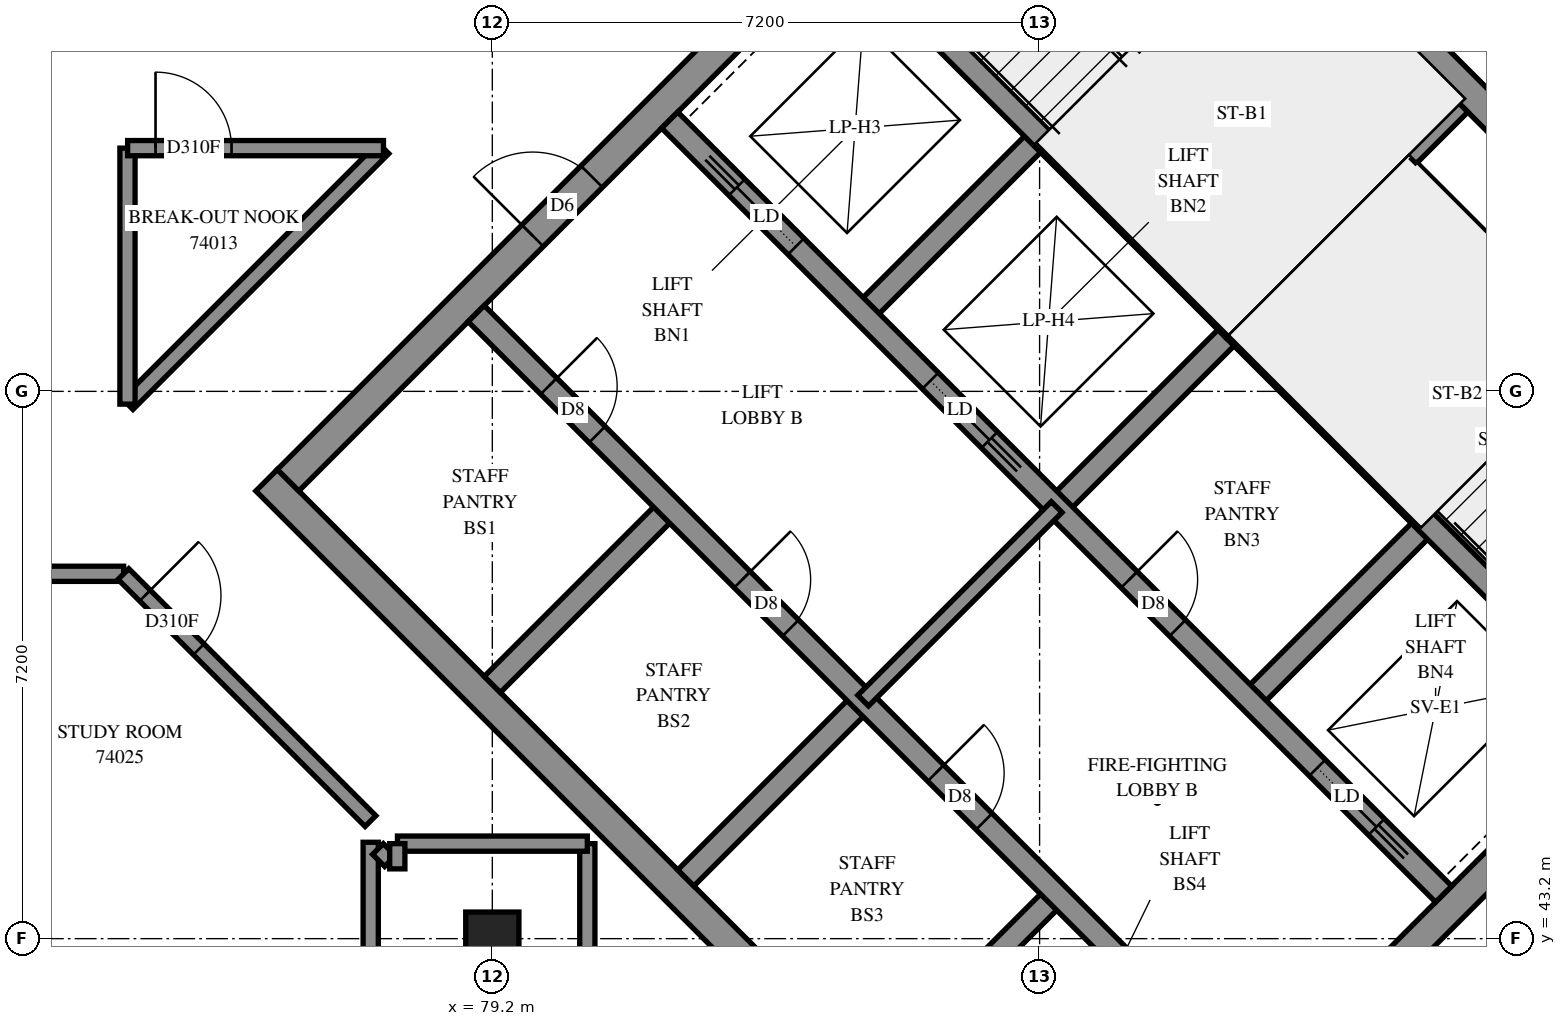
"""IFC4 building model, lengths in metres.
Left out: names, types, materials, properties, quantities, classifications, styles, units other than length and angle.
Written with IfcOpenShell. Run it as: python <this file> out.ifc"""

import sys

from ifc_helpers import new_model, si_unit, direction, frame, frame_2d, origin, origin_2d, place, context, subcontext, project, spatial, rectangle, extrude, element, fill, save


model = new_model("IFC4")
c1 = context("Model", 3, precision=1e-05, world=origin(), true_north=direction((0.0, 1.0)))
c2 = subcontext(c1, "Body", "Model", "MODEL_VIEW")
j1 = project(units=[si_unit("LENGTHUNIT", "METRE"), si_unit("PLANEANGLEUNIT", "RADIAN")], contexts=[c1])
p1 = place(None, origin())
s1 = spatial("IfcSite", under=j1, at=p1, CompositionType="ELEMENT")
p2 = place(p1, origin())
s2 = spatial("IfcBuilding", under=s1, at=p2, CompositionType="ELEMENT")
p3 = place(p2, frame((0.0, 0.0, 271.0)))
s3 = spatial("IfcBuildingStorey", under=s2, at=p3, CompositionType="ELEMENT", Elevation=271.0)
p4 = place(p3, frame((79.2, 43.2, 0.0), z_axis=(0.0, 0.0, 1.0), x_axis=(1.0, 0.0, 0.0)))
e1 = element("IfcColumn", 1, at=p4, inside=s3, PredefinedType="COLUMN", context=c2, shape_type="SweptSolid", body=[
    extrude(rectangle(XDim=0.7, YDim=0.7, at=origin_2d()), origin(), (0.0, 0.0, 1.0), 3.1),
])
p5 = place(p3, frame((76.23, 49.231, -0.3), z_axis=(0.0, 0.0, 1.0), x_axis=(0.7071034917, -0.7071100706, 0.0)))
e2 = element("IfcWall", 2, at=p5, inside=s3, PredefinedType="SHEAR", context=c2, shape_type="SweptSolid", body=[
    extrude(rectangle(XDim=15.2, YDim=0.4, at=frame_2d((7.6, 0.0))), origin(), (0.0, 0.0, 1.0), 2.7),
])
p6 = place(p3, frame((86.695, 59.696, -0.3), z_axis=(0.0, 0.0, 1.0), x_axis=(0.7071100706, -0.7071034917, 0.0)))
e3 = element("IfcWall", 3, at=p6, inside=s3, PredefinedType="SHEAR", context=c2, shape_type="SweptSolid", body=[
    extrude(rectangle(XDim=15.2, YDim=0.4, at=frame_2d((7.6, 0.0))), origin(), (0.0, 0.0, 1.0), 2.7),
])
p7 = place(p6, frame((10.4, 0.0, 0.3)))
e4 = element("IfcOpeningElement", 4, at=p7, cuts=e3, PredefinedType="OPENING", context=c2, shape_type="SweptSolid", body=[
    extrude(rectangle(XDim=0.8, YDim=2.1, at=frame_2d((0.4, 1.05))), frame((0.0, 0.21, 0.0), z_axis=(0.0, -1.0, 0.0), x_axis=(1.0, 0.0, 0.0)), (0.0, 0.0, 1.0), 0.42),
])
p8 = place(p3, frame((76.513, 49.231, -0.3), z_axis=(0.0, 0.0, 1.0), x_axis=(0.7071067812, 0.7071067812, 0.0)))
e5 = element("IfcWall", 5, at=p8, inside=s3, PredefinedType="SHEAR", context=c2, shape_type="SweptSolid", body=[
    extrude(rectangle(XDim=14.4, YDim=0.4, at=frame_2d((7.2, 0.0))), origin(), (0.0, 0.0, 1.0), 2.7),
])
p9 = place(p8, frame((4.55, 0.0, 0.3)))
e6 = element("IfcOpeningElement", 6, at=p9, cuts=e5, PredefinedType="OPENING", context=c2, shape_type="SweptSolid", body=[
    extrude(rectangle(XDim=1.1, YDim=2.1, at=frame_2d((0.55, 1.05))), frame((0.0, 0.21, 0.0), z_axis=(0.0, -1.0, 0.0), x_axis=(1.0, 0.0, 0.0)), (0.0, 0.0, 1.0), 0.42),
])
p10 = place(p8, frame((11.35, 0.0, 0.3)))
e7 = element("IfcOpeningElement", 7, at=p10, cuts=e5, PredefinedType="OPENING", context=c2, shape_type="SweptSolid", body=[
    extrude(rectangle(XDim=1.1, YDim=2.1, at=frame_2d((0.55, 1.05))), frame((0.0, 0.21, 0.0), z_axis=(0.0, -1.0, 0.0), x_axis=(1.0, 0.0, 0.0)), (0.0, 0.0, 1.0), 0.42),
])
p11 = place(p3, frame((86.978, 38.766, -0.3), z_axis=(0.0, 0.0, 1.0), x_axis=(0.7071067812, 0.7071067812, 0.0)))
e8 = element("IfcWall", 8, at=p11, inside=s3, PredefinedType="SHEAR", context=c2, shape_type="SweptSolid", body=[
    extrude(rectangle(XDim=14.4, YDim=0.4, at=frame_2d((7.2, 0.0))), origin(), (0.0, 0.0, 1.0), 2.7),
])
p12 = place(p11, frame((4.55, 0.0, 0.3)))
e9 = element("IfcOpeningElement", 9, at=p12, cuts=e8, PredefinedType="OPENING", context=c2, shape_type="SweptSolid", body=[
    extrude(rectangle(XDim=1.1, YDim=2.1, at=frame_2d((0.55, 1.05))), frame((0.0, 0.21, 0.0), z_axis=(0.0, -1.0, 0.0), x_axis=(1.0, 0.0, 0.0)), (0.0, 0.0, 1.0), 0.42),
])
p13 = place(p11, frame((11.35, 0.0, 0.3)))
e10 = element("IfcOpeningElement", 10, at=p13, cuts=e8, PredefinedType="OPENING", context=c2, shape_type="SweptSolid", body=[
    extrude(rectangle(XDim=1.1, YDim=2.1, at=frame_2d((0.55, 1.05))), frame((0.0, 0.21, 0.0), z_axis=(0.0, -1.0, 0.0), x_axis=(1.0, 0.0, 0.0)), (0.0, 0.0, 1.0), 0.42),
])
for number, where, z_axis, x_axis in (
    (11, (79.2, 46.544, 0.0), (0.0, 0.0, 1.0), (0.707, 0.707, 0.0)),
    (12, (84.079, 51.423, 0.0), (0.0, 0.0, 1.0), (0.707, 0.707, 0.0)),
):
    element("IfcWall", number, at=place(p3, frame(where, z_axis=z_axis, x_axis=x_axis)), inside=s3, PredefinedType="SOLIDWALL", context=c2, shape_type="SweptSolid", body=[
        extrude(rectangle(XDim=3.3, YDim=0.3, at=frame_2d((1.65, 0.0))), origin(), (0.0, 0.0, 1.0), 3.1),
    ])
p14 = place(p3, frame((81.746, 43.999, 0.0), z_axis=(0.0, 0.0, 1.0), x_axis=(0.7071067812, 0.7071067812, 0.0)))
e13 = element("IfcWall", 13, at=p14, inside=s3, PredefinedType="SOLIDWALL", context=c2, shape_type="SweptSolid", body=[
    extrude(rectangle(XDim=3.3, YDim=0.3, at=frame_2d((1.65, 0.0))), origin(), (0.0, 0.0, 1.0), 3.1),
])
p15 = place(p3, frame((86.625, 48.878, 0.0), z_axis=(0.0, 0.0, 1.0), x_axis=(0.7071067812, 0.7071067812, 0.0)))
e14 = element("IfcWall", 14, at=p15, inside=s3, PredefinedType="SOLIDWALL", context=c2, shape_type="SweptSolid", body=[
    extrude(rectangle(XDim=3.3, YDim=0.3, at=frame_2d((1.65, 0.0))), origin(), (0.0, 0.0, 1.0), 3.1),
])
p16 = place(p3, frame((84.291, 41.453, 0.0), z_axis=(0.0, 0.0, 1.0), x_axis=(0.7071067812, 0.7071067812, 0.0)))
e15 = element("IfcWall", 15, at=p16, inside=s3, PredefinedType="SOLIDWALL", context=c2, shape_type="SweptSolid", body=[
    extrude(rectangle(XDim=3.3, YDim=0.3, at=frame_2d((1.65, 0.0))), origin(), (0.0, 0.0, 1.0), 3.1),
])
p17 = place(p3, frame((89.17, 46.332, 0.0), z_axis=(0.0, 0.0, 1.0), x_axis=(0.7071067812, 0.7071067812, 0.0)))
e16 = element("IfcWall", 16, at=p17, inside=s3, PredefinedType="SOLIDWALL", context=c2, shape_type="SweptSolid", body=[
    extrude(rectangle(XDim=3.3, YDim=0.3, at=frame_2d((1.65, 0.0))), origin(), (0.0, 0.0, 1.0), 3.1),
])
p18 = place(p3, frame((78.988, 51.423, 0.0), z_axis=(0.0, 0.0, 1.0), x_axis=(0.7071067812, -0.7071067812, 0.0)))
e17 = element("IfcWall", 17, at=p18, inside=s3, PredefinedType="SOLIDWALL", context=c2, shape_type="SweptSolid", body=[
    extrude(rectangle(XDim=14.4, YDim=0.3, at=frame_2d((7.2, 0.0))), origin(), (0.0, 0.0, 1.0), 3.1),
])
p19 = place(p18, frame((1.35, 0.0, 0.0)))
e18 = element("IfcOpeningElement", 18, at=p19, cuts=e17, PredefinedType="OPENING", context=c2, shape_type="SweptSolid", body=[
    extrude(rectangle(XDim=0.9, YDim=2.1, at=frame_2d((0.45, 1.05))), frame((0.0, 0.16, 0.0), z_axis=(0.0, -1.0, 0.0), x_axis=(1.0, 0.0, 0.0)), (0.0, 0.0, 1.0), 0.32),
])
p20 = place(p18, frame((4.95, 0.0, 0.0)))
e19 = element("IfcOpeningElement", 19, at=p20, cuts=e17, PredefinedType="OPENING", context=c2, shape_type="SweptSolid", body=[
    extrude(rectangle(XDim=0.9, YDim=2.1, at=frame_2d((0.45, 1.05))), frame((0.0, 0.16, 0.0), z_axis=(0.0, -1.0, 0.0), x_axis=(1.0, 0.0, 0.0)), (0.0, 0.0, 1.0), 0.32),
])
p21 = place(p18, frame((8.55, 0.0, 0.0)))
e20 = element("IfcOpeningElement", 20, at=p21, cuts=e17, PredefinedType="OPENING", context=c2, shape_type="SweptSolid", body=[
    extrude(rectangle(XDim=0.9, YDim=2.1, at=frame_2d((0.45, 1.05))), frame((0.0, 0.16, 0.0), z_axis=(0.0, -1.0, 0.0), x_axis=(1.0, 0.0, 0.0)), (0.0, 0.0, 1.0), 0.32),
])
p22 = place(p18, frame((12.05, 0.0, 0.0)))
e21 = element("IfcOpeningElement", 21, at=p22, cuts=e17, PredefinedType="OPENING", context=c2, shape_type="SweptSolid", body=[
    extrude(rectangle(XDim=1.1, YDim=2.1, at=frame_2d((0.55, 1.05))), frame((0.0, 0.16, 0.0), z_axis=(0.0, -1.0, 0.0), x_axis=(1.0, 0.0, 0.0)), (0.0, 0.0, 1.0), 0.32),
])
p23 = place(p3, frame((81.534, 53.969, 0.0), z_axis=(0.0, 0.0, 1.0), x_axis=(0.707103309, -0.7071102534, 0.0)))
e22 = element("IfcWall", 22, at=p23, inside=s3, PredefinedType="SOLIDWALL", context=c2, shape_type="SweptSolid", body=[
    extrude(rectangle(XDim=14.4, YDim=0.3, at=frame_2d((7.2, 0.0))), origin(), (0.0, 0.0, 1.0), 3.1),
])
p24 = place(p23, frame((8.55, 0.0, 0.0)))
e23 = element("IfcOpeningElement", 23, at=p24, cuts=e22, PredefinedType="OPENING", context=c2, shape_type="SweptSolid", body=[
    extrude(rectangle(XDim=0.9, YDim=2.1, at=frame_2d((0.45, 1.05))), frame((0.0, 0.16, 0.0), z_axis=(0.0, -1.0, 0.0), x_axis=(1.0, 0.0, 0.0)), (0.0, 0.0, 1.0), 0.32),
])
p25 = place(p23, frame((1.25, 0.0, 0.0)))
e24 = element("IfcOpeningElement", 24, at=p25, cuts=e22, PredefinedType="OPENING", context=c2, shape_type="SweptSolid", body=[
    extrude(rectangle(XDim=1.1, YDim=2.1, at=frame_2d((0.55, 1.05))), frame((0.0, 0.16, 0.0), z_axis=(0.0, -1.0, 0.0), x_axis=(1.0, 0.0, 0.0)), (0.0, 0.0, 1.0), 0.32),
])
p26 = place(p23, frame((4.85, 0.0, 0.0)))
e25 = element("IfcOpeningElement", 25, at=p26, cuts=e22, PredefinedType="OPENING", context=c2, shape_type="SweptSolid", body=[
    extrude(rectangle(XDim=1.1, YDim=2.1, at=frame_2d((0.55, 1.05))), frame((0.0, 0.16, 0.0), z_axis=(0.0, -1.0, 0.0), x_axis=(1.0, 0.0, 0.0)), (0.0, 0.0, 1.0), 0.32),
])
p27 = place(p23, frame((12.05, 0.0, 0.0)))
e26 = element("IfcOpeningElement", 26, at=p27, cuts=e22, PredefinedType="OPENING", context=c2, shape_type="SweptSolid", body=[
    extrude(rectangle(XDim=1.1, YDim=2.1, at=frame_2d((0.55, 1.05))), frame((0.0, 0.16, 0.0), z_axis=(0.0, -1.0, 0.0), x_axis=(1.0, 0.0, 0.0)), (0.0, 0.0, 1.0), 0.32),
])
for number, where, z_axis, x_axis in (
    (27, (83.867, 56.302, 0.0), (0.0, 0.0, 1.0), (0.707, -0.707, 0.0)),
    (28, (88.958, 51.211, 0.0), (0.0, 0.0, 1.0), (0.707, -0.707, 0.0)),
):
    element("IfcWall", number, at=place(p3, frame(where, z_axis=z_axis, x_axis=x_axis)), inside=s3, PredefinedType="SOLIDWALL", context=c2, shape_type="SweptSolid", body=[
        extrude(rectangle(XDim=7.2, YDim=0.3, at=frame_2d((3.6, 0.0))), origin(), (0.0, 0.0, 1.0), 3.1),
    ])
p28 = place(p3, frame((88.958, 51.211, 0.0), z_axis=(0.0, 0.0, 1.0), x_axis=(0.7071067812, 0.7071067812, 0.0)))
e29 = element("IfcWall", 29, at=p28, inside=s3, PredefinedType="SOLIDWALL", context=c2, shape_type="SweptSolid", body=[
    extrude(rectangle(XDim=4.2, YDim=0.3, at=frame_2d((2.1, 0.0))), origin(), (0.0, 0.0, 1.0), 3.1),
])
p29 = place(p3, frame((91.313, 53.354, 0.0), z_axis=(0.0, 0.0, 1.0), x_axis=(0.7071067812, -0.7071067812, 0.0)))
e30 = element("IfcWall", 30, at=p29, inside=s3, PredefinedType="PARTITIONING", context=c2, shape_type="SweptSolid", body=[
    extrude(rectangle(XDim=5.95, YDim=0.15, at=frame_2d((2.975, 0.0))), origin(), (0.0, 0.0, 1.0), 3.1),
])
p30 = place(p3, frame((84.079, 46.332, 0.0), z_axis=(0.0, 0.0, 1.0), x_axis=(0.7071067812, 0.7071067812, 0.0)))
e31 = element("IfcWall", 31, at=p30, inside=s3, PredefinedType="PARTITIONING", context=c2, shape_type="SweptSolid", body=[
    extrude(rectangle(XDim=3.6, YDim=0.2, at=frame_2d((1.8, 0.0))), origin(), (0.0, 0.0, 1.0), 3.1),
])
p31 = place(p3, frame((55.2, 48.0, 0.0), z_axis=(0.0, 0.0, 1.0), x_axis=(1.0, 0.0, 0.0)))
e32 = element("IfcWall", 32, at=p31, inside=s3, PredefinedType="PARTITIONING", context=c2, shape_type="SweptSolid", body=[
    extrude(rectangle(XDim=19.15, YDim=0.2, at=frame_2d((9.575, 0.0))), origin(), (0.0, 0.0, 1.0), 3.1),
])
p32 = place(p31, frame((4.433, 0.0, 0.0)))
e33 = element("IfcOpeningElement", 33, at=p32, cuts=e32, PredefinedType="OPENING", context=c2, shape_type="SweptSolid", body=[
    extrude(rectangle(XDim=1.0, YDim=2.1, at=frame_2d((0.5, 1.05))), frame((0.0, 0.11, 0.0), z_axis=(0.0, -1.0, 0.0), x_axis=(1.0, 0.0, 0.0)), (0.0, 0.0, 1.0), 0.22),
])
p33 = place(p31, frame((6.508, 0.0, 0.0)))
e34 = element("IfcOpeningElement", 34, at=p33, cuts=e32, PredefinedType="OPENING", context=c2, shape_type="SweptSolid", body=[
    extrude(rectangle(XDim=1.0, YDim=2.1, at=frame_2d((0.5, 1.05))), frame((0.0, 0.11, 0.0), z_axis=(0.0, -1.0, 0.0), x_axis=(1.0, 0.0, 0.0)), (0.0, 0.0, 1.0), 0.22),
])
p34 = place(p31, frame((13.499, 0.0, 0.0)))
e35 = element("IfcOpeningElement", 35, at=p34, cuts=e32, PredefinedType="OPENING", context=c2, shape_type="SweptSolid", body=[
    extrude(rectangle(XDim=0.9, YDim=2.1, at=frame_2d((0.45, 1.05))), frame((0.0, 0.11, 0.0), z_axis=(0.0, -1.0, 0.0), x_axis=(1.0, 0.0, 0.0)), (0.0, 0.0, 1.0), 0.22),
])
p35 = place(p3, frame((74.401, 50.233, 0.0), z_axis=(0.0, 0.0, 1.0), x_axis=(0.7071067812, 0.7071067812, 0.0)))
e36 = element("IfcWall", 36, at=p35, inside=s3, PredefinedType="PARTITIONING", context=c2, shape_type="SweptSolid", body=[
    extrude(rectangle(XDim=4.76, YDim=0.2, at=frame_2d((2.38, 0.0))), origin(), (0.0, 0.0, 1.0), 3.1),
])
p36 = place(p3, frame((74.347, 47.997, 0.0), z_axis=(0.0, 0.0, 1.0), x_axis=(0.7071067812, -0.7071067812, 0.0)))
e37 = element("IfcWall", 37, at=p36, inside=s3, PredefinedType="PARTITIONING", context=c2, shape_type="SweptSolid", body=[
    extrude(rectangle(XDim=4.596, YDim=0.2, at=frame_2d((2.298, 0.0))), origin(), (0.0, 0.0, 1.0), 3.1),
])
p37 = place(p36, frame((0.401, 0.0, 0.0)))
e38 = element("IfcOpeningElement", 38, at=p37, cuts=e37, PredefinedType="OPENING", context=c2, shape_type="SweptSolid", body=[
    extrude(rectangle(XDim=1.0, YDim=2.1, at=frame_2d((0.5, 1.05))), frame((0.0, 0.11, 0.0), z_axis=(0.0, -1.0, 0.0), x_axis=(1.0, 0.0, 0.0)), (0.0, 0.0, 1.0), 0.22),
])
p38 = place(p3, frame((74.4, 50.232, 0.0), z_axis=(0.0, 0.0, 1.0), x_axis=(0.0, 1.0, 0.0)))
e39 = element("IfcWall", 39, at=p38, inside=s3, PredefinedType="PARTITIONING", context=c2, shape_type="SweptSolid", body=[
    extrude(rectangle(XDim=3.368, YDim=0.2, at=frame_2d((1.684, 0.0))), origin(), (0.0, 0.0, 1.0), 3.1),
])
p39 = place(p3, frame((74.402, 53.6, 0.0), z_axis=(0.0, 0.0, 1.0), x_axis=(1.0, 0.0, 0.0)))
e40 = element("IfcWall", 40, at=p39, inside=s3, PredefinedType="PARTITIONING", context=c2, shape_type="SweptSolid", body=[
    extrude(rectangle(XDim=3.366, YDim=0.2, at=frame_2d((1.683, 0.0))), origin(), (0.0, 0.0, 1.0), 3.1),
])
p40 = place(p39, frame((0.367, 0.0, 0.0)))
e41 = element("IfcOpeningElement", 41, at=p40, cuts=e40, PredefinedType="OPENING", context=c2, shape_type="SweptSolid", body=[
    extrude(rectangle(XDim=1.0, YDim=2.1, at=frame_2d((0.5, 1.05))), frame((0.0, 0.11, 0.0), z_axis=(0.0, -1.0, 0.0), x_axis=(1.0, 0.0, 0.0)), (0.0, 0.0, 1.0), 0.22),
])
p41 = place(p3, frame((77.6, 41.487, 0.0), z_axis=(0.0, 0.0, 1.0), x_axis=(0.0, 1.0, 0.0)))
e42 = element("IfcWall", 42, at=p41, inside=s3, PredefinedType="PARTITIONING", context=c2, shape_type="SweptSolid", body=[
    extrude(rectangle(XDim=2.981, YDim=0.2, at=frame_2d((1.49, 0.0))), origin(), (0.0, 0.0, 1.0), 3.1),
])
for number, where, z_axis, x_axis in (
    (43, (80.45, 41.952, 0.0), (0.0, 0.0, 1.0), (0.0, 1.0, 0.0)),
    (44, (77.952, 44.45, 0.0), (0.0, 0.0, 1.0), (1.0, 0.0, 0.0)),
):
    element("IfcWall", number, at=place(p3, frame(where, z_axis=z_axis, x_axis=x_axis)), inside=s3, PredefinedType="PARTITIONING", context=c2, shape_type="SweptSolid", body=[
        extrude(rectangle(XDim=2.498, YDim=0.2, at=frame_2d((1.249, 0.0))), origin(), (0.0, 0.0, 1.0), 3.1),
    ])
p42 = place(p3, frame((77.695, 44.38, 0.0), z_axis=(0.0, 0.0, 1.0), x_axis=(0.707329037, -0.7068844555, 0.0)))
e45 = element("IfcWall", 45, at=p42, inside=s3, PredefinedType="PARTITIONING", context=c2, shape_type="SweptSolid", body=[
    extrude(rectangle(XDim=0.225, YDim=0.2, at=frame_2d((0.112, 0.0))), origin(), (0.0, 0.0, 1.0), 3.1),
])
p43 = place(p3, frame((77.95, 44.118, 0.0), z_axis=(0.0, 0.0, 1.0), x_axis=(0.0, 1.0, 0.0)))
e46 = element("IfcWall", 46, at=p43, inside=s3, PredefinedType="PARTITIONING", context=c2, shape_type="SweptSolid", body=[
    extrude(rectangle(XDim=0.332, YDim=0.2, at=frame_2d((0.166, 0.0))), origin(), (0.0, 0.0, 1.0), 3.1),
])
p44 = place(p9, origin())
e47 = element("IfcDoor", 47, at=p44, inside=s3, OperationType="DOUBLE_DOOR_SINGLE_SWING", PredefinedType="DOOR", context=c2, shape_type="SweptSolid", body=[
    extrude(rectangle(XDim=1.1, YDim=2.1, at=frame_2d((0.55, 1.05))), frame((0.0, 0.025, 0.0), z_axis=(0.0, -1.0, 0.0), x_axis=(1.0, 0.0, 0.0)), (0.0, 0.0, 1.0), 0.05),
])
fill(e6, e47)
p45 = place(p19, origin())
e48 = element("IfcDoor", 48, at=p45, inside=s3, OperationType="SINGLE_SWING_LEFT", PredefinedType="DOOR", context=c2, shape_type="SweptSolid", body=[
    extrude(rectangle(XDim=0.9, YDim=2.1, at=frame_2d((0.45, 1.05))), frame((0.0, 0.025, 0.0), z_axis=(0.0, -1.0, 0.0), x_axis=(1.0, 0.0, 0.0)), (0.0, 0.0, 1.0), 0.05),
])
fill(e18, e48)
p46 = place(p20, origin())
e49 = element("IfcDoor", 49, at=p46, inside=s3, OperationType="SINGLE_SWING_LEFT", PredefinedType="DOOR", context=c2, shape_type="SweptSolid", body=[
    extrude(rectangle(XDim=0.9, YDim=2.1, at=frame_2d((0.45, 1.05))), frame((0.0, 0.025, 0.0), z_axis=(0.0, -1.0, 0.0), x_axis=(1.0, 0.0, 0.0)), (0.0, 0.0, 1.0), 0.05),
])
fill(e19, e49)
p47 = place(p21, origin())
e50 = element("IfcDoor", 50, at=p47, inside=s3, OperationType="SINGLE_SWING_LEFT", PredefinedType="DOOR", context=c2, shape_type="SweptSolid", body=[
    extrude(rectangle(XDim=0.9, YDim=2.1, at=frame_2d((0.45, 1.05))), frame((0.0, 0.025, 0.0), z_axis=(0.0, -1.0, 0.0), x_axis=(1.0, 0.0, 0.0)), (0.0, 0.0, 1.0), 0.05),
])
fill(e20, e50)
p48 = place(p24, origin())
e51 = element("IfcDoor", 51, at=p48, inside=s3, OperationType="SINGLE_SWING_LEFT", PredefinedType="DOOR", context=c2, shape_type="SweptSolid", body=[
    extrude(rectangle(XDim=0.9, YDim=2.1, at=frame_2d((0.45, 1.05))), frame((0.0, 0.025, 0.0), z_axis=(0.0, -1.0, 0.0), x_axis=(1.0, 0.0, 0.0)), (0.0, 0.0, 1.0), 0.05),
])
fill(e23, e51)
p49 = place(p25, origin())
e52 = element("IfcDoor", 52, at=p49, inside=s3, OperationType="SLIDING_TO_LEFT", PredefinedType="DOOR", context=c2, shape_type="SweptSolid", body=[
    extrude(rectangle(XDim=1.1, YDim=2.1, at=frame_2d((0.55, 1.05))), frame((0.0, 0.025, 0.0), z_axis=(0.0, -1.0, 0.0), x_axis=(1.0, 0.0, 0.0)), (0.0, 0.0, 1.0), 0.05),
])
fill(e24, e52)
p50 = place(p26, origin())
e53 = element("IfcDoor", 53, at=p50, inside=s3, OperationType="SLIDING_TO_RIGHT", PredefinedType="DOOR", context=c2, shape_type="SweptSolid", body=[
    extrude(rectangle(XDim=1.1, YDim=2.1, at=frame_2d((0.55, 1.05))), frame((0.0, 0.025, 0.0), z_axis=(0.0, -1.0, 0.0), x_axis=(1.0, 0.0, 0.0)), (0.0, 0.0, 1.0), 0.05),
])
fill(e25, e53)
p51 = place(p27, origin())
e54 = element("IfcDoor", 54, at=p51, inside=s3, OperationType="SLIDING_TO_RIGHT", PredefinedType="DOOR", context=c2, shape_type="SweptSolid", body=[
    extrude(rectangle(XDim=1.1, YDim=2.1, at=frame_2d((0.55, 1.05))), frame((0.0, 0.025, 0.0), z_axis=(0.0, -1.0, 0.0), x_axis=(1.0, 0.0, 0.0)), (0.0, 0.0, 1.0), 0.05),
])
fill(e26, e54)
p52 = place(p40, origin())
e55 = element("IfcDoor", 55, at=p52, inside=s3, OperationType="SINGLE_SWING_RIGHT", PredefinedType="DOOR", context=c2, shape_type="SweptSolid", body=[
    extrude(rectangle(XDim=1.0, YDim=2.1, at=frame_2d((0.5, 1.05))), frame((0.0, 0.025, 0.0), z_axis=(0.0, -1.0, 0.0), x_axis=(1.0, 0.0, 0.0)), (0.0, 0.0, 1.0), 0.05),
])
fill(e41, e55)
p53 = place(p37, origin())
e56 = element("IfcDoor", 56, at=p53, inside=s3, OperationType="SINGLE_SWING_LEFT", PredefinedType="DOOR", context=c2, shape_type="SweptSolid", body=[
    extrude(rectangle(XDim=1.0, YDim=2.1, at=frame_2d((0.5, 1.05))), frame((0.0, 0.025, 0.0), z_axis=(0.0, -1.0, 0.0), x_axis=(1.0, 0.0, 0.0)), (0.0, 0.0, 1.0), 0.05),
])
fill(e38, e56)
save(model, sys.argv[1])
